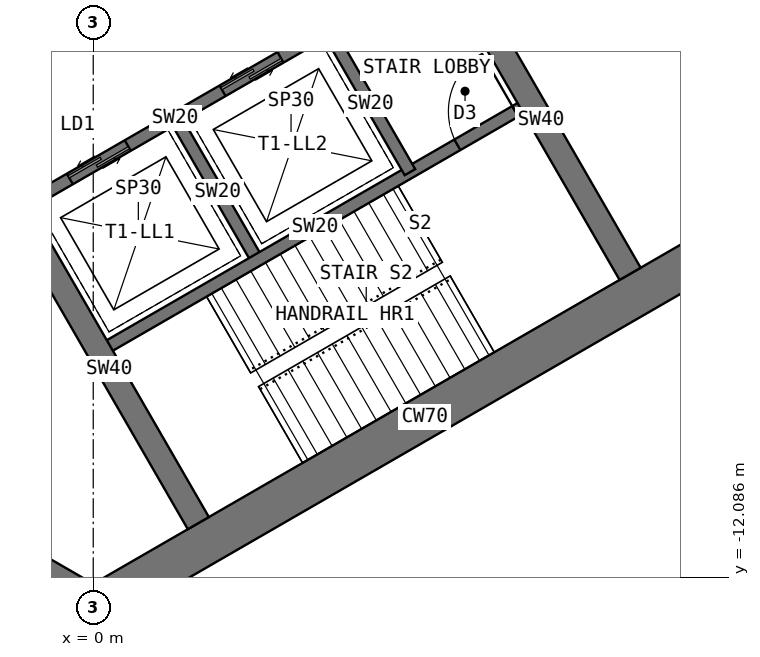
"""IFC4 building model, lengths in metres.
Left out: names, types, materials, properties, quantities, classifications, styles, units other than length and angle.
Written with IfcOpenShell. Run it as: python <this file> out.ifc"""

import sys

from ifc_helpers import new_model, si_unit, direction, frame, frame_2d, origin, place, context, subcontext, project, spatial, rectangle, extrude, element, fill, save


model = new_model("IFC4")
c1 = context("Model", 3, precision=1e-05, world=origin(), true_north=direction((0.0, 1.0)))
c2 = subcontext(c1, "Body", "Model", "MODEL_VIEW")
j1 = project(units=[si_unit("LENGTHUNIT", "METRE"), si_unit("PLANEANGLEUNIT", "RADIAN")], contexts=[c1])
p1 = place(None, origin())
s1 = spatial("IfcSite", under=j1, at=p1, CompositionType="ELEMENT")
p2 = place(p1, origin())
s2 = spatial("IfcBuilding", under=s1, at=p2, CompositionType="ELEMENT")
p3 = place(p2, frame((0.0, 0.0, 92.5)))
s3 = spatial("IfcBuildingStorey", under=s2, at=p3, CompositionType="ELEMENT", Elevation=92.5)
p4 = place(p3, frame((-3.939, -10.322, 0.0), z_axis=(0.0, 0.0, 1.0), x_axis=(0.866011268655, -0.500024481964, 0.0)))
e1 = element("IfcWall", 1, at=p4, inside=s3, PredefinedType="SHEAR", context=c2, shape_type="SweptSolid", body=[
    extrude(rectangle(XDim=4.548, YDim=0.7, at=frame_2d((2.274, 0.0))), origin(), (0.0, 0.0, 1.0), 5.0),
])
p5 = place(p3, frame((0.0, -12.596, 0.0), z_axis=(0.0, 0.0, 1.0), x_axis=(0.866021940709, 0.500005998175, 0.0)))
e2 = element("IfcWall", 2, at=p5, inside=s3, PredefinedType="SHEAR", context=c2, shape_type="SweptSolid", body=[
    extrude(rectangle(XDim=12.596, YDim=0.7, at=frame_2d((6.298, 0.0))), origin(), (0.0, 0.0, 1.0), 5.0),
])
p6 = place(p3, frame((-1.164, -5.984, 0.0), z_axis=(0.0, 0.0, 1.0), x_axis=(0.866026010844, 0.49999894854, 0.0)))
e3 = element("IfcWall", 3, at=p6, inside=s3, PredefinedType="SHEAR", context=c2, shape_type="SweptSolid", body=[
    extrude(rectangle(XDim=8.0, YDim=0.2, at=frame_2d((4.0, 0.0))), origin(), (0.0, 0.0, 1.0), 5.0),
])
p7 = place(p6, frame((6.3, 0.0, 0.0)))
e4 = element("IfcOpeningElement", 4, at=p7, cuts=e3, PredefinedType="OPENING", context=c2, shape_type="SweptSolid", body=[
    extrude(rectangle(XDim=1.2, YDim=2.1, at=frame_2d((0.6, 1.05))), frame((0.0, 0.11, 0.0), z_axis=(0.0, -1.0, 0.0), x_axis=(1.0, 0.0, 0.0)), (0.0, 0.0, 1.0), 0.22),
])
p8 = place(p6, frame((0.9, 0.0, 0.0)))
e5 = element("IfcOpeningElement", 5, at=p8, cuts=e3, PredefinedType="OPENING", context=c2, shape_type="SweptSolid", body=[
    extrude(rectangle(XDim=1.1, YDim=2.2, at=frame_2d((0.55, 1.1))), frame((0.0, 0.11, 0.0), z_axis=(0.0, -1.0, 0.0), x_axis=(1.0, 0.0, 0.0)), (0.0, 0.0, 1.0), 0.22),
])
p9 = place(p6, frame((3.8, 0.0, 0.0)))
e6 = element("IfcOpeningElement", 6, at=p9, cuts=e3, PredefinedType="OPENING", context=c2, shape_type="SweptSolid", body=[
    extrude(rectangle(XDim=1.1, YDim=2.2, at=frame_2d((0.55, 1.1))), frame((0.0, 0.11, 0.0), z_axis=(0.0, -1.0, 0.0), x_axis=(1.0, 0.0, 0.0)), (0.0, 0.0, 1.0), 0.22),
])
p10 = place(p3, frame((1.397, -4.62, 0.0), z_axis=(0.0, 0.0, 1.0), x_axis=(0.499936506574, -0.866062058628, 0.0)))
e7 = element("IfcWall", 7, at=p10, inside=s3, PredefinedType="SHEAR", context=c2, shape_type="SweptSolid", body=[
    extrude(rectangle(XDim=2.6, YDim=0.2, at=frame_2d((1.3, 0.0))), origin(), (0.0, 0.0, 1.0), 5.0),
])
p11 = place(p3, frame((3.909, -3.17, 0.0), z_axis=(0.0, 0.0, 1.0), x_axis=(0.49997716683, -0.86603858612, 0.0)))
e8 = element("IfcWall", 8, at=p11, inside=s3, PredefinedType="SHEAR", context=c2, shape_type="SweptSolid", body=[
    extrude(rectangle(XDim=2.6, YDim=0.2, at=frame_2d((1.3, 0.0))), origin(), (0.0, 0.0, 1.0), 5.0),
])
p12 = place(p3, frame((0.186, -8.322, 0.0), z_axis=(0.0, 0.0, 1.0), x_axis=(0.866026010844, 0.49999894854, 0.0)))
e9 = element("IfcWall", 9, at=p12, inside=s3, PredefinedType="SHEAR", context=c2, shape_type="SweptSolid", body=[
    extrude(rectangle(XDim=8.0, YDim=0.2, at=frame_2d((4.0, 0.0))), origin(), (0.0, 0.0, 1.0), 5.0),
])
p13 = place(p12, frame((6.7, 0.0, 0.0)))
e10 = element("IfcOpeningElement", 10, at=p13, cuts=e9, PredefinedType="OPENING", context=c2, shape_type="SweptSolid", body=[
    extrude(rectangle(XDim=1.1, YDim=2.1, at=frame_2d((0.55, 1.05))), frame((0.0, 0.11, 0.0), z_axis=(0.0, -1.0, 0.0), x_axis=(1.0, 0.0, 0.0)), (0.0, 0.0, 1.0), 0.22),
])
for number, where, z_axis, x_axis in (
    (11, (5.901, -2.02, 0.0), (0.0, 0.0, 1.0), (0.5, -0.866, 0.0)),
    (12, (-1.201, -6.12, 0.0), (0.0, 0.0, 1.0), (0.5, -0.866, 0.0)),
):
    element("IfcWall", number, at=place(p3, frame(where, z_axis=z_axis, x_axis=x_axis)), inside=s3, PredefinedType="SHEAR", context=c2, shape_type="SweptSolid", body=[
        extrude(rectangle(XDim=5.858, YDim=0.4, at=frame_2d((2.929, 0.0))), origin(), (0.0, 0.0, 1.0), 5.0),
    ])
p14 = place(p8, origin())
e13 = element("IfcDoor", 13, at=p14, inside=s3, OperationType="DOUBLE_DOOR_SLIDING", PredefinedType="DOOR", context=c2, shape_type="SweptSolid", body=[
    extrude(rectangle(XDim=1.1, YDim=2.2, at=frame_2d((0.55, 1.1))), frame((0.0, 0.025, 0.0), z_axis=(0.0, -1.0, 0.0), x_axis=(1.0, 0.0, 0.0)), (0.0, 0.0, 1.0), 0.05),
])
fill(e5, e13)
p15 = place(p9, origin())
e14 = element("IfcDoor", 14, at=p15, inside=s3, OperationType="DOUBLE_DOOR_SLIDING", PredefinedType="DOOR", context=c2, shape_type="SweptSolid", body=[
    extrude(rectangle(XDim=1.1, YDim=2.2, at=frame_2d((0.55, 1.1))), frame((0.0, 0.025, 0.0), z_axis=(0.0, -1.0, 0.0), x_axis=(1.0, 0.0, 0.0)), (0.0, 0.0, 1.0), 0.05),
])
fill(e6, e14)
p16 = place(p13, origin())
e15 = element("IfcDoor", 15, at=p16, inside=s3, OperationType="SINGLE_SWING_RIGHT", PredefinedType="DOOR", context=c2, shape_type="SweptSolid", body=[
    extrude(rectangle(XDim=1.1, YDim=2.1, at=frame_2d((0.55, 1.05))), frame((0.0, 0.025, 0.0), z_axis=(0.0, -1.0, 0.0), x_axis=(1.0, 0.0, 0.0)), (0.0, 0.0, 1.0), 0.05),
])
fill(e10, e15)
save(model, sys.argv[1])
